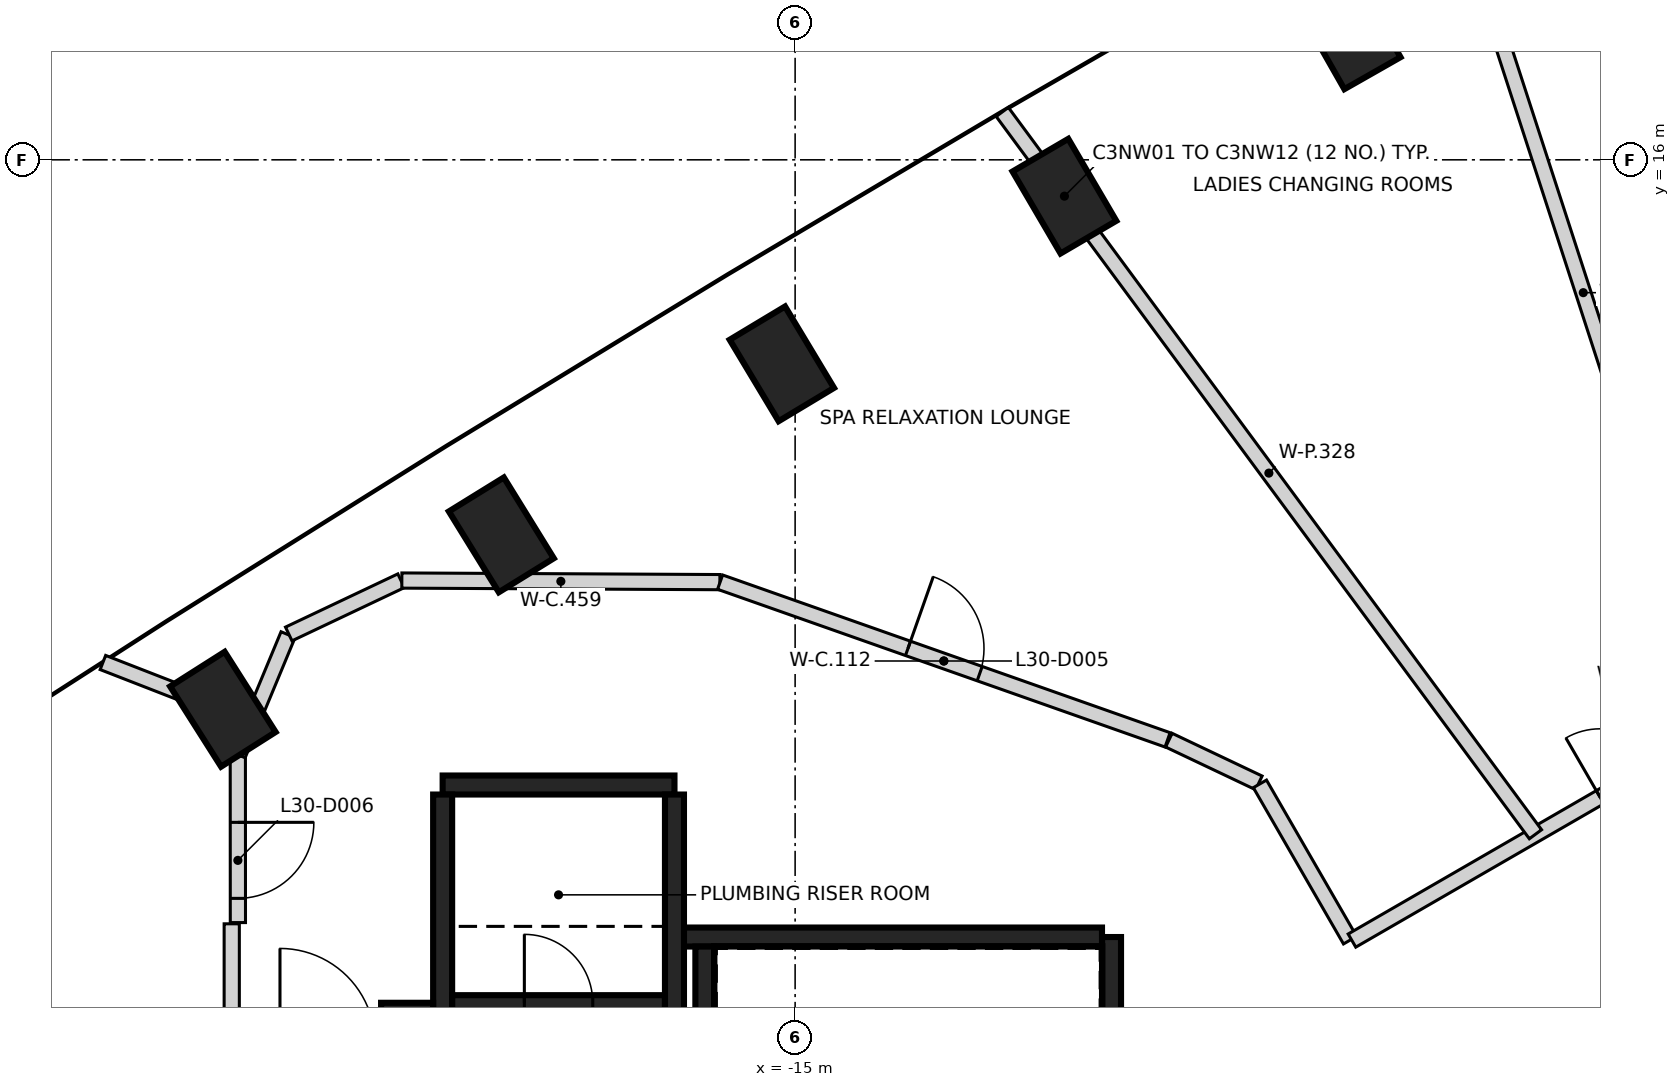
"""IFC4 building model, lengths in metres.
Left out: names, types, materials, properties, quantities, classifications, styles, units other than length and angle.
Written with IfcOpenShell. Run it as: python <this file> out.ifc"""

import sys

from ifc_helpers import new_model, si_unit, direction, frame, frame_2d, origin, origin_2d, place, context, subcontext, project, spatial, rectangle, extrude, element, fill, save


model = new_model("IFC4")
c1 = context("Model", 3, precision=1e-05, world=origin(), true_north=direction((0.0, 1.0)))
c2 = subcontext(c1, "Body", "Model", "MODEL_VIEW")
j1 = project(units=[si_unit("LENGTHUNIT", "METRE"), si_unit("PLANEANGLEUNIT", "RADIAN")], contexts=[c1])
p1 = place(None, origin())
s1 = spatial("IfcSite", under=j1, at=p1, CompositionType="ELEMENT")
p2 = place(p1, origin())
s2 = spatial("IfcBuilding", under=s1, at=p2, CompositionType="ELEMENT")
p3 = place(p2, frame((0.0, 0.0, 123.8)))
s3 = spatial("IfcBuildingStorey", under=s2, at=p3, CompositionType="ELEMENT", Elevation=123.8)
for number, where, z_axis, x_axis in (
    (1, (-7.714, 17.683, -0.4), (0.0, 0.0, 1.0), (-0.495, 0.869, 0.0)),
    (2, (-11.457, 15.522, -0.4), (0.0, 0.0, 1.0), (-0.505, 0.863, 0.0)),
    (3, (-15.175, 13.316, -0.4), (0.0, 0.0, 1.0), (-0.515, 0.857, 0.0)),
    (4, (-18.865, 11.066, -0.4), (0.0, 0.0, 1.0), (-0.526, 0.851, 0.0)),
    (5, (-22.529, 8.772, -0.4), (0.0, 0.0, 1.0), (-0.536, 0.844, 0.0)),
):
    element("IfcColumn", number, at=place(p3, frame(where, z_axis=z_axis, x_axis=x_axis)), inside=s3, PredefinedType="COLUMN", context=c2, shape_type="SweptSolid", body=[
        extrude(rectangle(XDim=1.25, YDim=0.85, at=origin_2d()), origin(), (0.0, 0.0, 1.0), 5.0),
    ])
p4 = place(p3, frame((-10.837, 5.775, 0.0), z_axis=(0.0, 0.0, 1.0), x_axis=(0.0, -1.0, 0.0)))
e6 = element("IfcWall", 6, at=p4, inside=s3, PredefinedType="SHEAR", context=c2, shape_type="SweptSolid", body=[
    extrude(rectangle(XDim=11.55, YDim=0.25, at=frame_2d((5.775, 0.0))), origin(), (0.0, 0.0, 1.0), 4.6),
])
p5 = place(p4, frame((10.025, 0.0, 0.0)))
e7 = element("IfcOpeningElement", 7, at=p5, cuts=e6, PredefinedType="OPENING", context=c2, shape_type="SweptSolid", body=[
    extrude(rectangle(XDim=1.2, YDim=2.1, at=frame_2d((0.6, 1.05))), frame((0.0, 0.135, 0.0), z_axis=(0.0, -1.0, 0.0), x_axis=(1.0, 0.0, 0.0)), (0.0, 0.0, 1.0), 0.27),
])
p6 = place(p4, frame((8.725, 0.0, 0.0)))
e8 = element("IfcOpeningElement", 8, at=p6, cuts=e6, PredefinedType="OPENING", context=c2, shape_type="SweptSolid", body=[
    extrude(rectangle(XDim=1.2, YDim=2.1, at=frame_2d((0.6, 1.05))), frame((0.0, 0.135, 0.0), z_axis=(0.0, -1.0, 0.0), x_axis=(1.0, 0.0, 0.0)), (0.0, 0.0, 1.0), 0.27),
])
p7 = place(p3, frame((-16.472, 5.775, 0.0), z_axis=(0.0, 0.0, 1.0), x_axis=(1.0, 0.0, 0.0)))
e9 = element("IfcWall", 9, at=p7, inside=s3, PredefinedType="SHEAR", context=c2, shape_type="SweptSolid", body=[
    extrude(rectangle(XDim=5.51, YDim=0.25, at=frame_2d((2.755, 0.0))), origin(), (0.0, 0.0, 1.0), 4.6),
])
p8 = place(p3, frame((-19.637, 7.775, 0.0), z_axis=(0.0, 0.0, 1.0), x_axis=(1.0, 0.0, 0.0)))
e10 = element("IfcWall", 10, at=p8, inside=s3, PredefinedType="SHEAR", context=c2, shape_type="SweptSolid", body=[
    extrude(rectangle(XDim=3.05, YDim=0.25, at=frame_2d((1.525, 0.0))), origin(), (0.0, 0.0, 1.0), 4.6),
])
for number, where, z_axis, x_axis in (
    (11, (-16.587, 7.65, 0.0), (0.0, 0.0, 1.0), (0.0, -1.0, 0.0)),
    (12, (-19.637, 4.785, 0.0), (0.0, 0.0, 1.0), (0.0, 1.0, 0.0)),
):
    element("IfcWall", number, at=place(p3, frame(where, z_axis=z_axis, x_axis=x_axis)), inside=s3, PredefinedType="SHEAR", context=c2, shape_type="SweptSolid", body=[
        extrude(rectangle(XDim=2.865, YDim=0.25, at=frame_2d((1.432, 0.0))), origin(), (0.0, 0.0, 1.0), 4.6),
    ])
p9 = place(p3, frame((-16.187, 3.2, 0.0), z_axis=(0.0, 0.0, 1.0), x_axis=(0.0, 1.0, 0.0)))
e13 = element("IfcWall", 13, at=p9, inside=s3, PredefinedType="SHEAR", context=c2, shape_type="SweptSolid", body=[
    extrude(rectangle(XDim=2.449, YDim=0.25, at=frame_2d((1.225, 0.0))), origin(), (0.0, 0.0, 1.0), 4.6),
])
p10 = place(p3, frame((-20.447, 4.785, 0.0), z_axis=(0.0, 0.0, 1.0), x_axis=(1.0, 0.0, 0.0)))
e14 = element("IfcWall", 14, at=p10, inside=s3, PredefinedType="SHEAR", context=c2, shape_type="SweptSolid", body=[
    extrude(rectangle(XDim=0.685, YDim=0.25, at=frame_2d((0.342, 0.0))), origin(), (0.0, 0.0, 1.0), 4.6),
])
p11 = place(p3, frame((-19.511, 4.91, 0.0), z_axis=(0.0, 0.0, 1.0), x_axis=(1.0, 0.0, 0.0)))
e15 = element("IfcWall", 15, at=p11, inside=s3, PredefinedType="SHEAR", context=c2, shape_type="SweptSolid", body=[
    extrude(rectangle(XDim=2.798, YDim=0.2, at=frame_2d((1.399, 0.0))), origin(), (0.0, 0.0, 1.0), 4.6),
])
p12 = place(p11, frame((0.949, 0.0, 0.0)))
e16 = element("IfcOpeningElement", 16, at=p12, cuts=e15, PredefinedType="OPENING", context=c2, shape_type="SweptSolid", body=[
    extrude(rectangle(XDim=0.9, YDim=2.1, at=frame_2d((0.45, 1.05))), frame((0.0, 0.11, 0.0), z_axis=(0.0, -1.0, 0.0), x_axis=(1.0, 0.0, 0.0)), (0.0, 0.0, 1.0), 0.22),
])
p13 = place(p3, frame((-22.412, 4.56, 0.0), z_axis=(0.0, 0.0, 1.0), x_axis=(0.0, 1.0, 0.0)))
e17 = element("IfcWall", 17, at=p13, inside=s3, PredefinedType="PARTITIONING", context=c2, shape_type="SweptSolid", body=[
    extrude(rectangle(XDim=1.389, YDim=0.2, at=frame_2d((0.694, 0.0))), origin(), (0.0, 0.0, 1.0), 4.6),
])
p14 = place(p3, frame((-22.332, 8.156, 0.0), z_axis=(0.0, 0.0, 1.0), x_axis=(0.000445732071, -0.999999900661, 0.0)))
e18 = element("IfcWall", 18, at=p14, inside=s3, PredefinedType="PARTITIONING", context=c2, shape_type="SweptSolid", body=[
    extrude(rectangle(XDim=2.191, YDim=0.2, at=frame_2d((1.095, 0.0))), origin(), (0.0, 0.0, 1.0), 4.6),
])
p15 = place(p14, frame((0.872, 0.0, 0.0)))
e19 = element("IfcOpeningElement", 19, at=p15, cuts=e18, PredefinedType="OPENING", context=c2, shape_type="SweptSolid", body=[
    extrude(rectangle(XDim=1.0, YDim=2.1, at=frame_2d((0.5, 1.05))), frame((0.0, 0.11, 0.0), z_axis=(0.0, -1.0, 0.0), x_axis=(1.0, 0.0, 0.0)), (0.0, 0.0, 1.0), 0.22),
])
p16 = place(p3, frame((-22.328, 8.172, 0.0), z_axis=(0.0, 0.0, 1.0), x_axis=(0.383795251276, 0.923418217872, 0.0)))
e20 = element("IfcWall", 20, at=p16, inside=s3, PredefinedType="PARTITIONING", context=c2, shape_type="SweptSolid", body=[
    extrude(rectangle(XDim=1.712, YDim=0.2, at=frame_2d((0.856, 0.0))), origin(), (0.0, 0.0, 1.0), 3.7),
])
p17 = place(p3, frame((-21.662, 9.762, 0.0), z_axis=(0.0, 0.0, 1.0), x_axis=(0.903777351921, 0.428002918394, 0.0)))
e21 = element("IfcWall", 21, at=p17, inside=s3, PredefinedType="PARTITIONING", context=c2, shape_type="SweptSolid", body=[
    extrude(rectangle(XDim=1.635, YDim=0.2, at=frame_2d((0.818, 0.0))), origin(), (0.0, 0.0, 1.0), 3.7),
])
p18 = place(p3, frame((-20.174, 10.465, 0.0), z_axis=(0.0, 0.0, 1.0), x_axis=(0.999987409632, -0.005018025279, 0.0)))
e22 = element("IfcWall", 22, at=p18, inside=s3, PredefinedType="PARTITIONING", context=c2, shape_type="SweptSolid", body=[
    extrude(rectangle(XDim=4.184, YDim=0.2, at=frame_2d((2.092, 0.0))), origin(), (0.0, 0.0, 1.0), 3.7),
])
p19 = place(p3, frame((-15.987, 10.444, 0.0), z_axis=(0.0, 0.0, 1.0), x_axis=(0.943118792832, -0.332455925811, 0.0)))
e23 = element("IfcWall", 23, at=p19, inside=s3, PredefinedType="PARTITIONING", context=c2, shape_type="SweptSolid", body=[
    extrude(rectangle(XDim=6.242, YDim=0.2, at=frame_2d((3.121, 0.0))), origin(), (0.0, 0.0, 1.0), 4.6),
])
p20 = place(p19, frame((2.621, 0.0, 0.0)))
e24 = element("IfcOpeningElement", 24, at=p20, cuts=e23, PredefinedType="OPENING", context=c2, shape_type="SweptSolid", body=[
    extrude(rectangle(XDim=1.0, YDim=2.1, at=frame_2d((0.5, 1.05))), frame((0.0, 0.11, 0.0), z_axis=(0.0, -1.0, 0.0), x_axis=(1.0, 0.0, 0.0)), (0.0, 0.0, 1.0), 0.22),
])
p21 = place(p3, frame((-10.083, 8.365, 0.0), z_axis=(0.0, 0.0, 1.0), x_axis=(0.903403797446, -0.428790833344, 0.0)))
e25 = element("IfcWall", 25, at=p21, inside=s3, PredefinedType="PARTITIONING", context=c2, shape_type="SweptSolid", body=[
    extrude(rectangle(XDim=1.311, YDim=0.2, at=frame_2d((0.655, 0.0))), origin(), (0.0, 0.0, 1.0), 4.6),
])
p22 = place(p3, frame((-8.885, 7.79, 0.0), z_axis=(0.0, 0.0, 1.0), x_axis=(0.499657156181, -0.866223254293, 0.0)))
e26 = element("IfcWall", 26, at=p22, inside=s3, PredefinedType="PARTITIONING", context=c2, shape_type="SweptSolid", body=[
    extrude(rectangle(XDim=2.374, YDim=0.2, at=frame_2d((1.187, 0.0))), origin(), (0.0, 0.0, 1.0), 4.6),
])
p23 = place(p3, frame((-7.674, 5.728, 0.0), z_axis=(0.0, 0.0, 1.0), x_axis=(0.865879153223, 0.50025322789, 0.0)))
e27 = element("IfcWall", 27, at=p23, inside=s3, PredefinedType="PARTITIONING", context=c2, shape_type="SweptSolid", body=[
    extrude(rectangle(XDim=8.679, YDim=0.2, at=frame_2d((4.34, 0.0))), origin(), (0.0, 0.0, 1.0), 4.6),
])
p24 = place(p23, frame((6.16, 0.0, 0.0)))
e28 = element("IfcOpeningElement", 28, at=p24, cuts=e27, PredefinedType="OPENING", context=c2, shape_type="SweptSolid", body=[
    extrude(rectangle(XDim=2.0, YDim=2.1, at=frame_2d((1.0, 1.05))), frame((0.0, 0.11, 0.0), z_axis=(0.0, -1.0, 0.0), x_axis=(1.0, 0.0, 0.0)), (0.0, 0.0, 1.0), 0.22),
])
p25 = place(p23, frame((3.77, 0.0, 0.0)))
e29 = element("IfcOpeningElement", 29, at=p25, cuts=e27, PredefinedType="OPENING", context=c2, shape_type="SweptSolid", body=[
    extrude(rectangle(XDim=0.9, YDim=2.1, at=frame_2d((0.45, 1.05))), frame((0.0, 0.11, 0.0), z_axis=(0.0, -1.0, 0.0), x_axis=(1.0, 0.0, 0.0)), (0.0, 0.0, 1.0), 0.22),
])
p26 = place(p3, frame((-24.107, 9.387, 0.0), z_axis=(0.0, 0.0, 1.0), x_axis=(0.931856759711, -0.362826376357, 0.0)))
e30 = element("IfcWall", 30, at=p26, inside=s3, PredefinedType="PARTITIONING", context=c2, shape_type="SweptSolid", body=[
    extrude(rectangle(XDim=2.107, YDim=0.2, at=frame_2d((1.054, 0.0))), origin(), (0.0, 0.0, 1.0), 4.6),
])
p27 = place(p3, frame((-12.275, 16.63, 0.0), z_axis=(0.0, 0.0, 1.0), x_axis=(0.593894030727, -0.804543274328, 0.0)))
e31 = element("IfcWall", 31, at=p27, inside=s3, PredefinedType="PARTITIONING", context=c2, shape_type="SweptSolid", body=[
    extrude(rectangle(XDim=11.811, YDim=0.2, at=frame_2d((5.906, 0.0))), origin(), (0.0, 0.0, 1.0), 4.6),
])
p28 = place(p3, frame((-6.481, 19.947, 0.0), z_axis=(0.0, 0.0, 1.0), x_axis=(0.308988795684, -0.951065678143, 0.0)))
e32 = element("IfcWall", 32, at=p28, inside=s3, PredefinedType="PARTITIONING", context=c2, shape_type="SweptSolid", body=[
    extrude(rectangle(XDim=11.974, YDim=0.2, at=frame_2d((5.987, 0.0))), origin(), (0.0, 0.0, 1.0), 3.7),
])
p29 = place(p12, origin())
e33 = element("IfcDoor", 33, at=p29, inside=s3, OperationType="SINGLE_SWING_LEFT", PredefinedType="DOOR", context=c2, shape_type="SweptSolid", body=[
    extrude(rectangle(XDim=0.9, YDim=2.1, at=frame_2d((0.45, 1.05))), frame((0.0, 0.025, 0.0), z_axis=(0.0, -1.0, 0.0), x_axis=(1.0, 0.0, 0.0)), (0.0, 0.0, 1.0), 0.05),
])
fill(e16, e33)
p30 = place(p25, origin())
e34 = element("IfcDoor", 34, at=p30, inside=s3, OperationType="SINGLE_SWING_LEFT", PredefinedType="DOOR", context=c2, shape_type="SweptSolid", body=[
    extrude(rectangle(XDim=0.9, YDim=2.1, at=frame_2d((0.45, 1.05))), frame((0.0, 0.025, 0.0), z_axis=(0.0, -1.0, 0.0), x_axis=(1.0, 0.0, 0.0)), (0.0, 0.0, 1.0), 0.05),
])
fill(e29, e34)
p31 = place(p20, origin())
e35 = element("IfcDoor", 35, at=p31, inside=s3, OperationType="SINGLE_SWING_LEFT", PredefinedType="DOOR", context=c2, shape_type="SweptSolid", body=[
    extrude(rectangle(XDim=1.0, YDim=2.1, at=frame_2d((0.5, 1.05))), frame((0.0, 0.025, 0.0), z_axis=(0.0, -1.0, 0.0), x_axis=(1.0, 0.0, 0.0)), (0.0, 0.0, 1.0), 0.05),
])
fill(e24, e35)
p32 = place(p15, frame((1.0, 0.0, 0.0), z_axis=(0.0, 0.0, 1.0), x_axis=(-1.0, 0.0, 0.0)))
e36 = element("IfcDoor", 36, at=p32, inside=s3, OperationType="SINGLE_SWING_LEFT", PredefinedType="DOOR", context=c2, shape_type="SweptSolid", body=[
    extrude(rectangle(XDim=1.0, YDim=2.1, at=frame_2d((0.5, 1.05))), frame((0.0, 0.025, 0.0), z_axis=(0.0, -1.0, 0.0), x_axis=(1.0, 0.0, 0.0)), (0.0, 0.0, 1.0), 0.05),
])
fill(e19, e36)
save(model, sys.argv[1])
